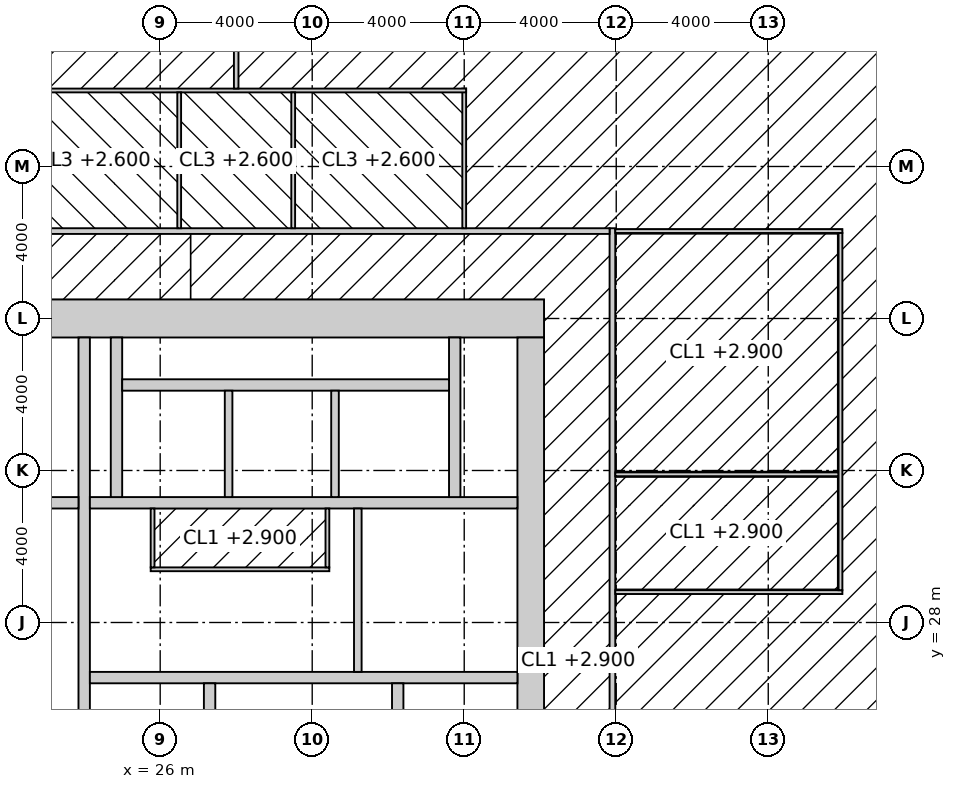
"""IFC4 building model, lengths in metres.
Left out: names, types, materials, properties, quantities, classifications, styles, units other than length and angle.
Written with IfcOpenShell. Run it as: python <this file> out.ifc"""

import sys

from ifc_helpers import new_model, si_unit, direction, frame, frame_2d, origin, place, context, subcontext, project, spatial, rectangle, extrude, element, fill, save


model = new_model("IFC4")
c1 = context("Model", 3, precision=1e-05, world=origin(), true_north=direction((0.0, 1.0)))
c2 = subcontext(c1, "Body", "Model", "MODEL_VIEW")
j1 = project(units=[si_unit("LENGTHUNIT", "METRE"), si_unit("PLANEANGLEUNIT", "RADIAN")], contexts=[c1])
p1 = place(None, origin())
s1 = spatial("IfcSite", under=j1, at=p1, CompositionType="ELEMENT")
p2 = place(p1, origin())
s2 = spatial("IfcBuilding", under=s1, at=p2, CompositionType="ELEMENT")
p3 = place(p2, frame((0.0, 0.0, 81.4)))
s3 = spatial("IfcBuildingStorey", under=s2, at=p3, CompositionType="ELEMENT", Elevation=81.4)
p4 = place(p3, frame((18.5, 36.0, -0.15), z_axis=(0.0, 0.0, 1.0), x_axis=(1.0, 0.0, 0.0)))
e1 = element("IfcWall", 1, at=p4, inside=s3, PredefinedType="SHEAR", context=c2, shape_type="SweptSolid", body=[
    extrude(rectangle(XDim=17.6, YDim=1.0, at=frame_2d((8.8, 0.0))), origin(), (0.0, 0.0, 1.0), 4.0),
])
p5 = place(p3, frame((35.75, 18.5, -0.15), z_axis=(0.0, 0.0, 1.0), x_axis=(0.0, 1.0, 0.0)))
e2 = element("IfcWall", 2, at=p5, inside=s3, PredefinedType="SHEAR", context=c2, shape_type="SweptSolid", body=[
    extrude(rectangle(XDim=17.0, YDim=0.7, at=frame_2d((8.5, 0.0))), origin(), (0.0, 0.0, 1.0), 4.0),
])
p6 = place(p5, frame((9.85, 0.0, 0.15)))
e3 = element("IfcOpeningElement", 3, at=p6, cuts=e2, PredefinedType="OPENING", context=c2, shape_type="SweptSolid", body=[
    extrude(rectangle(XDim=1.0, YDim=2.2, at=frame_2d((0.5, 1.1))), frame((0.0, 0.36, 0.0), z_axis=(0.0, -1.0, 0.0), x_axis=(1.0, 0.0, 0.0)), (0.0, 0.0, 1.0), 0.72),
])
p7 = place(p3, frame((24.0, 18.5, -0.15), z_axis=(0.0, 0.0, 1.0), x_axis=(0.0, 1.0, 0.0)))
e4 = element("IfcWall", 4, at=p7, inside=s3, PredefinedType="SHEAR", context=c2, shape_type="SweptSolid", body=[
    extrude(rectangle(XDim=17.0, YDim=0.3, at=frame_2d((8.5, 0.0))), origin(), (0.0, 0.0, 1.0), 4.0),
])
p8 = place(p7, frame((9.6, 0.0, 0.15)))
e5 = element("IfcOpeningElement", 5, at=p8, cuts=e4, PredefinedType="OPENING", context=c2, shape_type="SweptSolid", body=[
    extrude(rectangle(XDim=1.5, YDim=2.4, at=frame_2d((0.75, 1.2))), frame((0.0, 0.16, 0.0), z_axis=(0.0, -1.0, 0.0), x_axis=(1.0, 0.0, 0.0)), (0.0, 0.0, 1.0), 0.32),
])
p9 = place(p3, frame((24.15, 26.55, -0.15), z_axis=(0.0, 0.0, 1.0), x_axis=(1.0, 0.0, 0.0)))
e6 = element("IfcWall", 6, at=p9, inside=s3, PredefinedType="SHEAR", context=c2, shape_type="SweptSolid", body=[
    extrude(rectangle(XDim=11.25, YDim=0.3, at=frame_2d((5.625, 0.0))), origin(), (0.0, 0.0, 1.0), 4.0),
])
p10 = place(p9, frame((9.25, 0.0, 0.15)))
e7 = element("IfcOpeningElement", 7, at=p10, cuts=e6, PredefinedType="OPENING", context=c2, shape_type="SweptSolid", body=[
    extrude(rectangle(XDim=1.0, YDim=2.2, at=frame_2d((0.5, 1.1))), frame((0.0, 0.16, 0.0), z_axis=(0.0, -1.0, 0.0), x_axis=(1.0, 0.0, 0.0)), (0.0, 0.0, 1.0), 0.32),
])
p11 = place(p9, frame((4.9, 0.0, 0.15)))
e8 = element("IfcOpeningElement", 8, at=p11, cuts=e6, PredefinedType="OPENING", context=c2, shape_type="SweptSolid", body=[
    extrude(rectangle(XDim=1.5, YDim=2.4, at=frame_2d((0.75, 1.2))), frame((0.0, 0.16, 0.0), z_axis=(0.0, -1.0, 0.0), x_axis=(1.0, 0.0, 0.0)), (0.0, 0.0, 1.0), 0.32),
])
p12 = place(p3, frame((27.3, 18.5, -0.15), z_axis=(0.0, 0.0, 1.0), x_axis=(0.0, 1.0, 0.0)))
e9 = element("IfcWall", 9, at=p12, inside=s3, PredefinedType="SHEAR", context=c2, shape_type="SweptSolid", body=[
    extrude(rectangle(XDim=7.9, YDim=0.3, at=frame_2d((3.95, 0.0))), origin(), (0.0, 0.0, 1.0), 4.0),
])
p13 = place(p12, frame((6.4, 0.0, 0.15)))
e10 = element("IfcOpeningElement", 10, at=p13, cuts=e9, PredefinedType="OPENING", context=c2, shape_type="SweptSolid", body=[
    extrude(rectangle(XDim=1.0, YDim=2.2, at=frame_2d((0.5, 1.1))), frame((0.0, 0.16, 0.0), z_axis=(0.0, -1.0, 0.0), x_axis=(1.0, 0.0, 0.0)), (0.0, 0.0, 1.0), 0.32),
])
p14 = place(p3, frame((32.25, 18.5, -0.15), z_axis=(0.0, 0.0, 1.0), x_axis=(0.0, 1.0, 0.0)))
e11 = element("IfcWall", 11, at=p14, inside=s3, PredefinedType="SHEAR", context=c2, shape_type="SweptSolid", body=[
    extrude(rectangle(XDim=7.9, YDim=0.3, at=frame_2d((3.95, 0.0))), origin(), (0.0, 0.0, 1.0), 4.0),
])
p15 = place(p3, frame((24.15, 31.15, -0.15), z_axis=(0.0, 0.0, 1.0), x_axis=(1.0, 0.0, 0.0)))
e12 = element("IfcWall", 12, at=p15, inside=s3, PredefinedType="SHEAR", context=c2, shape_type="SweptSolid", body=[
    extrude(rectangle(XDim=11.25, YDim=0.3, at=frame_2d((5.625, 0.0))), origin(), (0.0, 0.0, 1.0), 4.0),
])
p16 = place(p15, frame((7.25, 0.0, 0.15)))
e13 = element("IfcOpeningElement", 13, at=p16, cuts=e12, PredefinedType="OPENING", context=c2, shape_type="SweptSolid", body=[
    extrude(rectangle(XDim=1.4, YDim=2.4, at=frame_2d((0.7, 1.2))), frame((0.0, 0.16, 0.0), z_axis=(0.0, -1.0, 0.0), x_axis=(1.0, 0.0, 0.0)), (0.0, 0.0, 1.0), 0.32),
])
p17 = place(p3, frame((18.5, 31.15, -0.15), z_axis=(0.0, 0.0, 1.0), x_axis=(1.0, 0.0, 0.0)))
e14 = element("IfcWall", 14, at=p17, inside=s3, PredefinedType="SHEAR", context=c2, shape_type="SweptSolid", body=[
    extrude(rectangle(XDim=5.35, YDim=0.3, at=frame_2d((2.675, 0.0))), origin(), (0.0, 0.0, 1.0), 4.0),
])
p18 = place(p17, frame((3.4, 0.0, 0.15)))
e15 = element("IfcOpeningElement", 15, at=p18, cuts=e14, PredefinedType="OPENING", context=c2, shape_type="SweptSolid", body=[
    extrude(rectangle(XDim=1.0, YDim=2.2, at=frame_2d((0.5, 1.1))), frame((0.0, 0.16, 0.0), z_axis=(0.0, -1.0, 0.0), x_axis=(1.0, 0.0, 0.0)), (0.0, 0.0, 1.0), 0.32),
])
for number, where, z_axis, x_axis in (
    (16, (24.85, 31.3, -0.15), (0.0, 0.0, 1.0), (0.0, 1.0, 0.0)),
    (17, (33.75, 31.3, -0.15), (0.0, 0.0, 1.0), (0.0, 1.0, 0.0)),
):
    element("IfcWall", number, at=place(p3, frame(where, z_axis=z_axis, x_axis=x_axis)), inside=s3, PredefinedType="SHEAR", context=c2, shape_type="SweptSolid", body=[
        extrude(rectangle(XDim=4.2, YDim=0.3, at=frame_2d((2.1, 0.0))), origin(), (0.0, 0.0, 1.0), 4.0),
    ])
p19 = place(p3, frame((25.0, 34.25, -0.15), z_axis=(0.0, 0.0, 1.0), x_axis=(1.0, 0.0, 0.0)))
e18 = element("IfcWall", 18, at=p19, inside=s3, PredefinedType="SHEAR", context=c2, shape_type="SweptSolid", body=[
    extrude(rectangle(XDim=8.6, YDim=0.3, at=frame_2d((4.3, 0.0))), origin(), (0.0, 0.0, 1.0), 4.0),
])
for number, where, z_axis, x_axis in (
    (19, (27.8, 31.3, -0.15), (0.0, 0.0, 1.0), (0.0, 1.0, 0.0)),
    (20, (30.6, 31.3, -0.15), (0.0, 0.0, 1.0), (0.0, 1.0, 0.0)),
):
    element("IfcWall", number, at=place(p3, frame(where, z_axis=z_axis, x_axis=x_axis)), inside=s3, PredefinedType="SOLIDWALL", context=c2, shape_type="SweptSolid", body=[
        extrude(rectangle(XDim=2.8, YDim=0.2, at=frame_2d((1.4, 0.0))), origin(), (0.0, 0.0, 1.0), 4.0),
    ])
p20 = place(p3, frame((31.2, 26.7, 0.0), z_axis=(0.0, 0.0, 1.0), x_axis=(0.0, 1.0, 0.0)))
e21 = element("IfcWall", 21, at=p20, inside=s3, PredefinedType="SOLIDWALL", context=c2, shape_type="SweptSolid", body=[
    extrude(rectangle(XDim=4.3, YDim=0.2, at=frame_2d((2.15, 0.0))), origin(), (0.0, 0.0, 1.0), 3.85),
])
p21 = place(p3, frame((25.75, 29.4, 0.0), z_axis=(0.0, 0.0, 1.0), x_axis=(1.0, 0.0, 0.0)))
e22 = element("IfcWall", 22, at=p21, inside=s3, PredefinedType="PARTITIONING", context=c2, shape_type="SweptSolid", body=[
    extrude(rectangle(XDim=4.7, YDim=0.1, at=frame_2d((2.35, 0.0))), origin(), (0.0, 0.0, 1.0), 3.85),
])
p22 = place(p21, frame((1.85, 0.0, 0.0)))
e23 = element("IfcOpeningElement", 23, at=p22, cuts=e22, PredefinedType="OPENING", context=c2, shape_type="SweptSolid", body=[
    extrude(rectangle(XDim=1.0, YDim=2.2, at=frame_2d((0.5, 1.1))), frame((0.0, 0.06, 0.0), z_axis=(0.0, -1.0, 0.0), x_axis=(1.0, 0.0, 0.0)), (0.0, 0.0, 1.0), 0.12),
])
for number, where, z_axis, x_axis in (
    (24, (25.8, 29.45, 0.0), (0.0, 0.0, 1.0), (0.0, 1.0, 0.0)),
    (25, (30.4, 29.45, 0.0), (0.0, 0.0, 1.0), (0.0, 1.0, 0.0)),
):
    element("IfcWall", number, at=place(p3, frame(where, z_axis=z_axis, x_axis=x_axis)), inside=s3, PredefinedType="PARTITIONING", context=c2, shape_type="SweptSolid", body=[
        extrude(rectangle(XDim=1.55, YDim=0.1, at=frame_2d((0.775, 0.0))), origin(), (0.0, 0.0, 1.0), 3.85),
    ])
p23 = place(p3, frame((37.9, 15.025, 0.0), z_axis=(0.0, 0.0, 1.0), x_axis=(0.0, 1.0, 0.0)))
e26 = element("IfcWall", 26, at=p23, inside=s3, PredefinedType="PARTITIONING", context=c2, shape_type="SweptSolid", body=[
    extrude(rectangle(XDim=23.35, YDim=0.15, at=frame_2d((11.675, 0.0))), origin(), (0.0, 0.0, 1.0), 2.95),
])
p24 = place(p23, frame((10.775, 0.0, 0.0)))
e27 = element("IfcOpeningElement", 27, at=p24, cuts=e26, PredefinedType="OPENING", context=c2, shape_type="SweptSolid", body=[
    extrude(rectangle(XDim=1.8, YDim=2.4, at=frame_2d((0.9, 1.2))), frame((0.0, 0.085, 0.0), z_axis=(0.0, -1.0, 0.0), x_axis=(1.0, 0.0, 0.0)), (0.0, 0.0, 1.0), 0.17),
])
p25 = place(p3, frame((15.775, 38.3, 0.0), z_axis=(0.0, 0.0, 1.0), x_axis=(1.0, 0.0, 0.0)))
e28 = element("IfcWall", 28, at=p25, inside=s3, PredefinedType="PARTITIONING", context=c2, shape_type="SweptSolid", body=[
    extrude(rectangle(XDim=22.05, YDim=0.15, at=frame_2d((11.025, 0.0))), origin(), (0.0, 0.0, 1.0), 3.85),
])
p26 = place(p25, frame((7.975, 0.0, 0.0)))
e29 = element("IfcOpeningElement", 29, at=p26, cuts=e28, PredefinedType="OPENING", context=c2, shape_type="SweptSolid", body=[
    extrude(rectangle(XDim=0.9, YDim=2.1, at=frame_2d((0.45, 1.05))), frame((0.0, 0.085, 0.0), z_axis=(0.0, -1.0, 0.0), x_axis=(1.0, 0.0, 0.0)), (0.0, 0.0, 1.0), 0.17),
])
p27 = place(p25, frame((11.725, 0.0, 0.0)))
e30 = element("IfcOpeningElement", 30, at=p27, cuts=e28, PredefinedType="OPENING", context=c2, shape_type="SweptSolid", body=[
    extrude(rectangle(XDim=1.0, YDim=2.1, at=frame_2d((0.5, 1.05))), frame((0.0, 0.085, 0.0), z_axis=(0.0, -1.0, 0.0), x_axis=(1.0, 0.0, 0.0)), (0.0, 0.0, 1.0), 0.17),
])
p28 = place(p25, frame((15.575, 0.0, 0.0)))
e31 = element("IfcOpeningElement", 31, at=p28, cuts=e28, PredefinedType="OPENING", context=c2, shape_type="SweptSolid", body=[
    extrude(rectangle(XDim=0.9, YDim=2.1, at=frame_2d((0.45, 1.05))), frame((0.0, 0.085, 0.0), z_axis=(0.0, -1.0, 0.0), x_axis=(1.0, 0.0, 0.0)), (0.0, 0.0, 1.0), 0.17),
])
p29 = place(p3, frame((34.0, 38.375, 0.0), z_axis=(0.0, 0.0, 1.0), x_axis=(0.0, 1.0, 0.0)))
e32 = element("IfcWall", 32, at=p29, inside=s3, PredefinedType="PARTITIONING", context=c2, shape_type="SweptSolid", body=[
    extrude(rectangle(XDim=3.675, YDim=0.1, at=frame_2d((1.837, 0.0))), origin(), (0.0, 0.0, 1.0), 2.95),
])
p30 = place(p3, frame((21.95, 42.0, 0.0), z_axis=(0.0, 0.0, 1.0), x_axis=(1.0, 0.0, 0.0)))
e33 = element("IfcWall", 33, at=p30, inside=s3, PredefinedType="PARTITIONING", context=c2, shape_type="SweptSolid", body=[
    extrude(rectangle(XDim=12.1, YDim=0.1, at=frame_2d((6.05, 0.0))), origin(), (0.0, 0.0, 1.0), 3.85),
])
for number, where, z_axis, x_axis in (
    (34, (26.5, 38.375, 0.0), (0.0, 0.0, 1.0), (0.0, 1.0, 0.0)),
    (35, (29.5, 38.375, 0.0), (0.0, 0.0, 1.0), (0.0, 1.0, 0.0)),
):
    element("IfcWall", number, at=place(p3, frame(where, z_axis=z_axis, x_axis=x_axis)), inside=s3, PredefinedType="PARTITIONING", context=c2, shape_type="SweptSolid", body=[
        extrude(rectangle(XDim=3.575, YDim=0.1, at=frame_2d((1.788, 0.0))), origin(), (0.0, 0.0, 1.0), 3.85),
    ])
p31 = place(p3, frame((28.0, 42.05, 0.0), z_axis=(0.0, 0.0, 1.0), x_axis=(0.0, 1.0, 0.0)))
e36 = element("IfcWall", 36, at=p31, inside=s3, PredefinedType="PARTITIONING", context=c2, shape_type="SweptSolid", body=[
    extrude(rectangle(XDim=5.65, YDim=0.12, at=frame_2d((2.825, 0.0))), origin(), (0.0, 0.0, 1.0), 3.85),
])
p32 = place(p3, frame((37.975, 28.8, 0.0), z_axis=(0.0, 0.0, 1.0), x_axis=(1.0, 0.0, 0.0)))
e37 = element("IfcWall", 37, at=p32, inside=s3, PredefinedType="PARTITIONING", context=c2, shape_type="SweptSolid", body=[
    extrude(rectangle(XDim=5.975, YDim=0.1, at=frame_2d((2.987, 0.0))), origin(), (0.0, 0.0, 1.0), 3.85),
])
p33 = place(p3, frame((37.975, 31.9, 0.0), z_axis=(0.0, 0.0, 1.0), x_axis=(1.0, 0.0, 0.0)))
e38 = element("IfcWall", 38, at=p33, inside=s3, PredefinedType="PARTITIONING", context=c2, shape_type="SweptSolid", body=[
    extrude(rectangle(XDim=5.875, YDim=0.1, at=frame_2d((2.938, 0.0))), origin(), (0.0, 0.0, 1.0), 2.95),
])
p34 = place(p3, frame((37.975, 38.3, 0.0), z_axis=(0.0, 0.0, 1.0), x_axis=(1.0, 0.0, 0.0)))
e39 = element("IfcWall", 39, at=p34, inside=s3, PredefinedType="PARTITIONING", context=c2, shape_type="SweptSolid", body=[
    extrude(rectangle(XDim=5.975, YDim=0.1, at=frame_2d((2.987, 0.0))), origin(), (0.0, 0.0, 1.0), 3.85),
])
p35 = place(p3, frame((43.9, 28.85, 0.0), z_axis=(0.0, 0.0, 1.0), x_axis=(0.0, 1.0, 0.0)))
e40 = element("IfcWall", 40, at=p35, inside=s3, PredefinedType="PARTITIONING", context=c2, shape_type="SweptSolid", body=[
    extrude(rectangle(XDim=9.4, YDim=0.1, at=frame_2d((4.7, 0.0))), origin(), (0.0, 0.0, 1.0), 3.85),
])
p36 = place(p35, frame((1.0, 0.0, 0.0)))
e41 = element("IfcOpeningElement", 41, at=p36, cuts=e40, PredefinedType="OPENING", context=c2, shape_type="SweptSolid", body=[
    extrude(rectangle(XDim=1.0, YDim=2.2, at=frame_2d((0.5, 1.1))), frame((0.0, 0.06, 0.0), z_axis=(0.0, -1.0, 0.0), x_axis=(1.0, 0.0, 0.0)), (0.0, 0.0, 1.0), 0.12),
])
p37 = place(p35, frame((5.75, 0.0, 0.0)))
e42 = element("IfcOpeningElement", 42, at=p37, cuts=e40, PredefinedType="OPENING", context=c2, shape_type="SweptSolid", body=[
    extrude(rectangle(XDim=1.0, YDim=2.2, at=frame_2d((0.5, 1.1))), frame((0.0, 0.06, 0.0), z_axis=(0.0, -1.0, 0.0), x_axis=(1.0, 0.0, 0.0)), (0.0, 0.0, 1.0), 0.12),
])
p38 = place(p13, origin())
e43 = element("IfcDoor", 43, at=p38, inside=s3, OperationType="SINGLE_SWING_RIGHT", PredefinedType="DOOR", context=c2, shape_type="SweptSolid", body=[
    extrude(rectangle(XDim=1.0, YDim=2.2, at=frame_2d((0.5, 1.1))), frame((0.0, 0.025, 0.0), z_axis=(0.0, -1.0, 0.0), x_axis=(1.0, 0.0, 0.0)), (0.0, 0.0, 1.0), 0.05),
])
fill(e10, e43)
p39 = place(p10, frame((1.0, 0.0, 0.0), z_axis=(0.0, 0.0, 1.0), x_axis=(-1.0, 0.0, 0.0)))
e44 = element("IfcDoor", 44, at=p39, inside=s3, OperationType="SINGLE_SWING_RIGHT", PredefinedType="DOOR", context=c2, shape_type="SweptSolid", body=[
    extrude(rectangle(XDim=1.0, YDim=2.2, at=frame_2d((0.5, 1.1))), frame((0.0, 0.025, 0.0), z_axis=(0.0, -1.0, 0.0), x_axis=(1.0, 0.0, 0.0)), (0.0, 0.0, 1.0), 0.05),
])
fill(e7, e44)
p40 = place(p6, origin())
e45 = element("IfcDoor", 45, at=p40, inside=s3, OperationType="SINGLE_SWING_RIGHT", PredefinedType="DOOR", context=c2, shape_type="SweptSolid", body=[
    extrude(rectangle(XDim=1.0, YDim=2.2, at=frame_2d((0.5, 1.1))), frame((0.0, 0.025, 0.0), z_axis=(0.0, -1.0, 0.0), x_axis=(1.0, 0.0, 0.0)), (0.0, 0.0, 1.0), 0.05),
])
fill(e3, e45)
p41 = place(p11, origin())
e46 = element("IfcDoor", 46, at=p41, inside=s3, OperationType="DOUBLE_DOOR_DOUBLE_SWING", PredefinedType="DOOR", context=c2, shape_type="SweptSolid", body=[
    extrude(rectangle(XDim=1.5, YDim=2.4, at=frame_2d((0.75, 1.2))), frame((0.0, 0.025, 0.0), z_axis=(0.0, -1.0, 0.0), x_axis=(1.0, 0.0, 0.0)), (0.0, 0.0, 1.0), 0.05),
])
fill(e8, e46)
p42 = place(p8, origin())
e47 = element("IfcDoor", 47, at=p42, inside=s3, OperationType="DOUBLE_DOOR_DOUBLE_SWING", PredefinedType="DOOR", context=c2, shape_type="SweptSolid", body=[
    extrude(rectangle(XDim=1.5, YDim=2.4, at=frame_2d((0.75, 1.2))), frame((0.0, 0.025, 0.0), z_axis=(0.0, -1.0, 0.0), x_axis=(1.0, 0.0, 0.0)), (0.0, 0.0, 1.0), 0.05),
])
fill(e5, e47)
p43 = place(p22, origin())
e48 = element("IfcDoor", 48, at=p43, inside=s3, OperationType="SINGLE_SWING_LEFT", PredefinedType="DOOR", context=c2, shape_type="SweptSolid", body=[
    extrude(rectangle(XDim=1.0, YDim=2.2, at=frame_2d((0.5, 1.1))), frame((0.0, 0.025, 0.0), z_axis=(0.0, -1.0, 0.0), x_axis=(1.0, 0.0, 0.0)), (0.0, 0.0, 1.0), 0.05),
])
fill(e23, e48)
p44 = place(p26, origin())
e49 = element("IfcDoor", 49, at=p44, inside=s3, OperationType="SINGLE_SWING_LEFT", PredefinedType="DOOR", context=c2, shape_type="SweptSolid", body=[
    extrude(rectangle(XDim=0.9, YDim=2.1, at=frame_2d((0.45, 1.05))), frame((0.0, 0.025, 0.0), z_axis=(0.0, -1.0, 0.0), x_axis=(1.0, 0.0, 0.0)), (0.0, 0.0, 1.0), 0.05),
])
fill(e29, e49)
p45 = place(p27, origin())
e50 = element("IfcDoor", 50, at=p45, inside=s3, OperationType="SLIDING_TO_LEFT", PredefinedType="DOOR", context=c2, shape_type="SweptSolid", body=[
    extrude(rectangle(XDim=1.0, YDim=2.1, at=frame_2d((0.5, 1.05))), frame((0.0, 0.025, 0.0), z_axis=(0.0, -1.0, 0.0), x_axis=(1.0, 0.0, 0.0)), (0.0, 0.0, 1.0), 0.05),
])
fill(e30, e50)
p46 = place(p28, origin())
e51 = element("IfcDoor", 51, at=p46, inside=s3, OperationType="SINGLE_SWING_LEFT", PredefinedType="DOOR", context=c2, shape_type="SweptSolid", body=[
    extrude(rectangle(XDim=0.9, YDim=2.1, at=frame_2d((0.45, 1.05))), frame((0.0, 0.025, 0.0), z_axis=(0.0, -1.0, 0.0), x_axis=(1.0, 0.0, 0.0)), (0.0, 0.0, 1.0), 0.05),
])
fill(e31, e51)
p47 = place(p24, origin())
e52 = element("IfcDoor", 52, at=p47, inside=s3, OperationType="DOUBLE_DOOR_DOUBLE_SWING", PredefinedType="DOOR", context=c2, shape_type="SweptSolid", body=[
    extrude(rectangle(XDim=1.8, YDim=2.4, at=frame_2d((0.9, 1.2))), frame((0.0, 0.025, 0.0), z_axis=(0.0, -1.0, 0.0), x_axis=(1.0, 0.0, 0.0)), (0.0, 0.0, 1.0), 0.05),
])
fill(e27, e52)
p48 = place(p36, origin())
e53 = element("IfcDoor", 53, at=p48, inside=s3, OperationType="SINGLE_SWING_LEFT", PredefinedType="DOOR", context=c2, shape_type="SweptSolid", body=[
    extrude(rectangle(XDim=1.0, YDim=2.2, at=frame_2d((0.5, 1.1))), frame((0.0, 0.025, 0.0), z_axis=(0.0, -1.0, 0.0), x_axis=(1.0, 0.0, 0.0)), (0.0, 0.0, 1.0), 0.05),
])
fill(e41, e53)
p49 = place(p37, origin())
e54 = element("IfcDoor", 54, at=p49, inside=s3, OperationType="SINGLE_SWING_RIGHT", PredefinedType="DOOR", context=c2, shape_type="SweptSolid", body=[
    extrude(rectangle(XDim=1.0, YDim=2.2, at=frame_2d((0.5, 1.1))), frame((0.0, 0.025, 0.0), z_axis=(0.0, -1.0, 0.0), x_axis=(1.0, 0.0, 0.0)), (0.0, 0.0, 1.0), 0.05),
])
fill(e42, e54)
p50 = place(p16, origin())
e55 = element("IfcDoor", 55, at=p50, inside=s3, OperationType="DOUBLE_DOOR_SLIDING", PredefinedType="DOOR", context=c2, shape_type="SweptSolid", body=[
    extrude(rectangle(XDim=1.4, YDim=2.4, at=frame_2d((0.7, 1.2))), frame((0.0, 0.025, 0.0), z_axis=(0.0, -1.0, 0.0), x_axis=(1.0, 0.0, 0.0)), (0.0, 0.0, 1.0), 0.05),
])
fill(e13, e55)
save(model, sys.argv[1])
